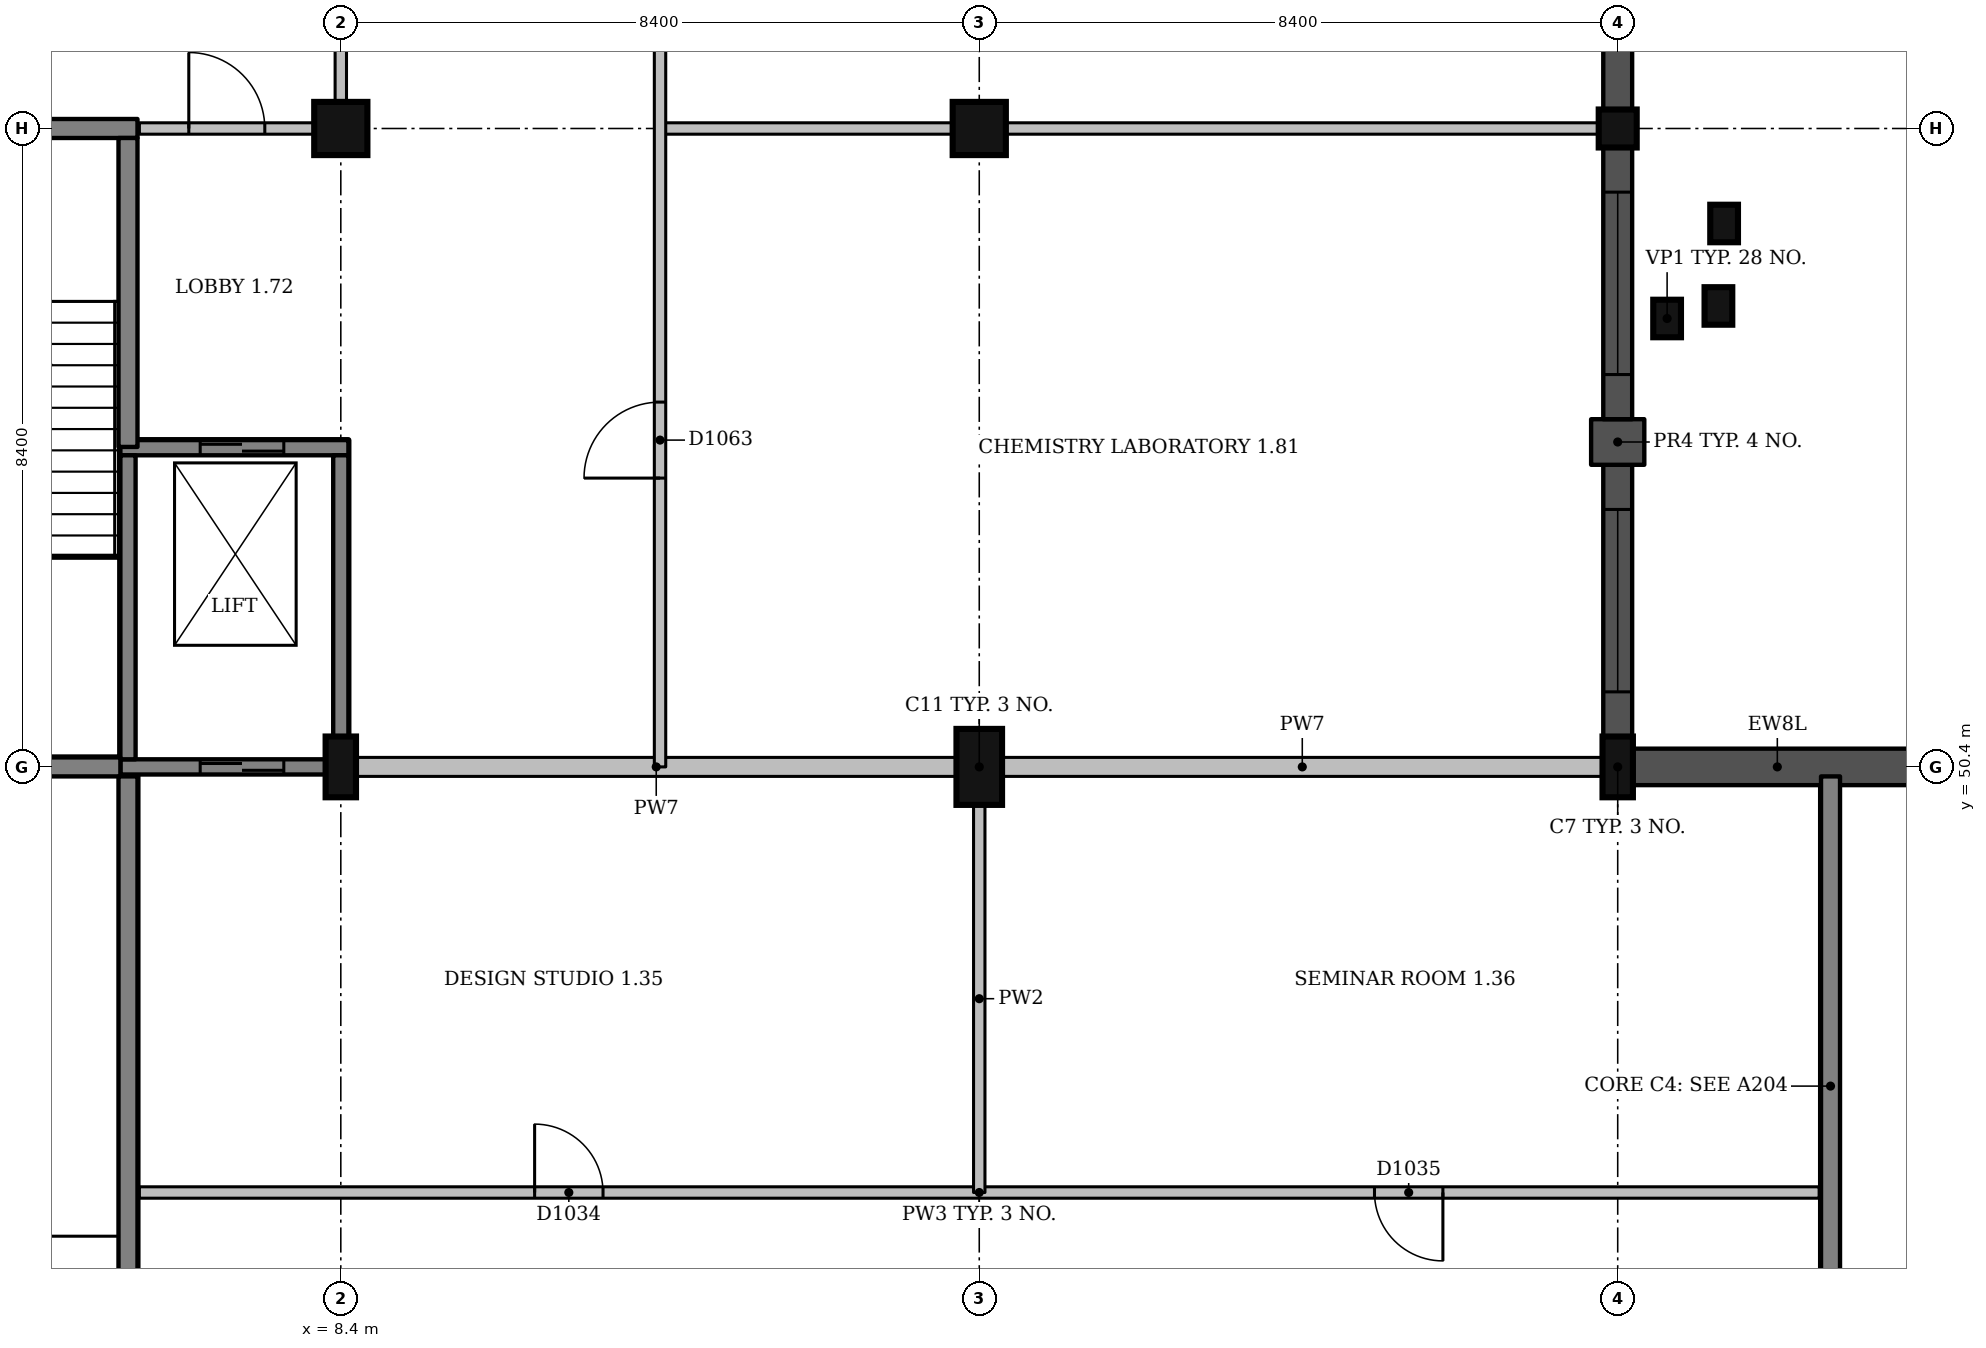
"""IFC4 building model, lengths in metres.
Left out: names, types, materials, properties, quantities, classifications, styles, units other than length and angle.
Written with IfcOpenShell. Run it as: python <this file> out.ifc"""

import sys

from ifc_helpers import new_model, si_unit, direction, frame, frame_2d, origin, origin_2d, place, context, subcontext, project, spatial, rectangle, extrude, element, fill, save


model = new_model("IFC4")
c1 = context("Model", 3, precision=1e-05, world=origin(), true_north=direction((0.0, 1.0)))
c2 = subcontext(c1, "Body", "Model", "MODEL_VIEW")
j1 = project(units=[si_unit("LENGTHUNIT", "METRE"), si_unit("PLANEANGLEUNIT", "RADIAN")], contexts=[c1])
p1 = place(None, origin())
s1 = spatial("IfcSite", under=j1, at=p1, CompositionType="ELEMENT")
p2 = place(p1, origin())
s2 = spatial("IfcBuilding", under=s1, at=p2, CompositionType="ELEMENT")
p3 = place(p2, frame((0.0, 0.0, 4.5)))
s3 = spatial("IfcBuildingStorey", under=s2, at=p3, CompositionType="ELEMENT", Elevation=4.5)
p4 = place(p3, frame((8.4, 50.4, 0.0), z_axis=(0.0, 0.0, 1.0), x_axis=(1.0, 0.0, 0.0)))
e1 = element("IfcColumn", 1, at=p4, inside=s3, PredefinedType="COLUMN", context=c2, shape_type="SweptSolid", body=[
    extrude(rectangle(XDim=0.4, YDim=0.8, at=origin_2d()), origin(), (0.0, 0.0, 1.0), 4.5),
])
p5 = place(p3, frame((16.8, 50.4, 0.0), z_axis=(0.0, 0.0, 1.0), x_axis=(1.0, 0.0, 0.0)))
e2 = element("IfcColumn", 2, at=p5, inside=s3, PredefinedType="COLUMN", context=c2, shape_type="SweptSolid", body=[
    extrude(rectangle(XDim=0.6, YDim=1.0, at=origin_2d()), origin(), (0.0, 0.0, 1.0), 4.5),
])
p6 = place(p3, frame((25.2, 50.4, 0.0), z_axis=(0.0, 0.0, 1.0), x_axis=(1.0, 0.0, 0.0)))
e3 = element("IfcColumn", 3, at=p6, inside=s3, PredefinedType="COLUMN", context=c2, shape_type="SweptSolid", body=[
    extrude(rectangle(XDim=0.4, YDim=0.8, at=origin_2d()), origin(), (0.0, 0.0, 1.0), 4.5),
])
for number, where, z_axis, x_axis in (
    (4, (8.4, 58.8, -1.5), (0.0, 0.0, 1.0), (1.0, 0.0, 0.0)),
    (5, (16.8, 58.8, -1.5), (0.0, 0.0, 1.0), (1.0, 0.0, 0.0)),
):
    element("IfcColumn", number, at=place(p3, frame(where, z_axis=z_axis, x_axis=x_axis)), inside=s3, PredefinedType="COLUMN", context=c2, shape_type="SweptSolid", body=[
        extrude(rectangle(XDim=0.7, YDim=0.7, at=origin_2d()), origin(), (0.0, 0.0, 1.0), 6.0),
    ])
p7 = place(p3, frame((25.2, 58.8, -1.5), z_axis=(0.0, 0.0, 1.0), x_axis=(1.0, 0.0, 0.0)))
e6 = element("IfcColumn", 6, at=p7, inside=s3, PredefinedType="COLUMN", context=c2, shape_type="SweptSolid", body=[
    extrude(rectangle(XDim=0.5, YDim=0.5, at=origin_2d()), origin(), (0.0, 0.0, 1.0), 6.0),
])
p8 = place(p3, frame((5.5, 50.4, 0.0), z_axis=(0.0, 0.0, 1.0), x_axis=(1.0, 0.0, 0.0)))
e7 = element("IfcWall", 7, at=p8, inside=s3, PredefinedType="SHEAR", context=c2, shape_type="SweptSolid", body=[
    extrude(rectangle(XDim=2.7, YDim=0.2, at=frame_2d((1.35, 0.0))), origin(), (0.0, 0.0, 1.0), 4.5),
])
p9 = place(p8, frame((1.05, 0.0, 0.0)))
e8 = element("IfcOpeningElement", 8, at=p9, cuts=e7, PredefinedType="OPENING", context=c2, shape_type="SweptSolid", body=[
    extrude(rectangle(XDim=1.1, YDim=2.1, at=frame_2d((0.55, 1.05))), frame((0.0, 0.11, 0.0), z_axis=(0.0, -1.0, 0.0), x_axis=(1.0, 0.0, 0.0)), (0.0, 0.0, 1.0), 0.22),
])
p10 = place(p3, frame((5.5, 54.6, 0.0), z_axis=(0.0, 0.0, 1.0), x_axis=(1.0, 0.0, 0.0)))
e9 = element("IfcWall", 9, at=p10, inside=s3, PredefinedType="SHEAR", context=c2, shape_type="SweptSolid", body=[
    extrude(rectangle(XDim=3.0, YDim=0.2, at=frame_2d((1.5, 0.0))), origin(), (0.0, 0.0, 1.0), 4.5),
])
p11 = place(p10, frame((1.05, 0.0, 0.0)))
e10 = element("IfcOpeningElement", 10, at=p11, cuts=e9, PredefinedType="OPENING", context=c2, shape_type="SweptSolid", body=[
    extrude(rectangle(XDim=1.1, YDim=2.1, at=frame_2d((0.55, 1.05))), frame((0.0, 0.11, 0.0), z_axis=(0.0, -1.0, 0.0), x_axis=(1.0, 0.0, 0.0)), (0.0, 0.0, 1.0), 0.22),
])
p12 = place(p3, frame((5.6, 50.5, 0.0), z_axis=(0.0, 0.0, 1.0), x_axis=(0.0, 1.0, 0.0)))
e11 = element("IfcWall", 11, at=p12, inside=s3, PredefinedType="SHEAR", context=c2, shape_type="SweptSolid", body=[
    extrude(rectangle(XDim=4.0, YDim=0.2, at=frame_2d((2.0, 0.0))), origin(), (0.0, 0.0, 1.0), 4.5),
])
p13 = place(p3, frame((8.4, 50.8, 0.0), z_axis=(0.0, 0.0, 1.0), x_axis=(0.0, 1.0, 0.0)))
e12 = element("IfcWall", 12, at=p13, inside=s3, PredefinedType="SHEAR", context=c2, shape_type="SweptSolid", body=[
    extrude(rectangle(XDim=3.7, YDim=0.2, at=frame_2d((1.85, 0.0))), origin(), (0.0, 0.0, 1.0), 4.5),
])
p14 = place(p3, frame((0.3, 50.4, 0.0), z_axis=(0.0, 0.0, 1.0), x_axis=(1.0, 0.0, 0.0)))
e13 = element("IfcWall", 13, at=p14, inside=s3, PredefinedType="SHEAR", context=c2, shape_type="SweptSolid", body=[
    extrude(rectangle(XDim=5.2, YDim=0.25, at=frame_2d((2.6, 0.0))), origin(), (0.0, 0.0, 1.0), 4.5),
])
p15 = place(p3, frame((5.6, 42.125, 0.0), z_axis=(0.0, 0.0, 1.0), x_axis=(0.0, 1.0, 0.0)))
e14 = element("IfcWall", 14, at=p15, inside=s3, PredefinedType="SHEAR", context=c2, shape_type="SweptSolid", body=[
    extrude(rectangle(XDim=8.15, YDim=0.25, at=frame_2d((4.075, 0.0))), origin(), (0.0, 0.0, 1.0), 4.5),
])
p16 = place(p15, frame((0.55, 0.0, 0.0)))
e15 = element("IfcOpeningElement", 15, at=p16, cuts=e14, PredefinedType="OPENING", context=c2, shape_type="SweptSolid", body=[
    extrude(rectangle(XDim=1.0, YDim=2.1, at=frame_2d((0.5, 1.05))), frame((0.0, 0.135, 0.0), z_axis=(0.0, -1.0, 0.0), x_axis=(1.0, 0.0, 0.0)), (0.0, 0.0, 1.0), 0.27),
])
p17 = place(p3, frame((28.0, 42.125, 0.0), z_axis=(0.0, 0.0, 1.0), x_axis=(0.0, 1.0, 0.0)))
e16 = element("IfcWall", 16, at=p17, inside=s3, PredefinedType="SHEAR", context=c2, shape_type="SweptSolid", body=[
    extrude(rectangle(XDim=8.15, YDim=0.25, at=frame_2d((4.075, 0.0))), origin(), (0.0, 0.0, 1.0), 4.5),
])
p18 = place(p17, frame((0.55, 0.0, 0.0)))
e17 = element("IfcOpeningElement", 17, at=p18, cuts=e16, PredefinedType="OPENING", context=c2, shape_type="SweptSolid", body=[
    extrude(rectangle(XDim=1.0, YDim=2.1, at=frame_2d((0.5, 1.05))), frame((0.0, 0.135, 0.0), z_axis=(0.0, -1.0, 0.0), x_axis=(1.0, 0.0, 0.0)), (0.0, 0.0, 1.0), 0.27),
])
p19 = place(p3, frame((0.25, 58.8, 0.0), z_axis=(0.0, 0.0, 1.0), x_axis=(1.0, 0.0, 0.0)))
e18 = element("IfcWall", 18, at=p19, inside=s3, PredefinedType="SHEAR", context=c2, shape_type="SweptSolid", body=[
    extrude(rectangle(XDim=5.475, YDim=0.25, at=frame_2d((2.738, 0.0))), origin(), (0.0, 0.0, 1.0), 4.5),
])
p20 = place(p19, frame((2.05, 0.0, 0.0)))
e19 = element("IfcOpeningElement", 19, at=p20, cuts=e18, PredefinedType="OPENING", context=c2, shape_type="SweptSolid", body=[
    extrude(rectangle(XDim=1.0, YDim=2.1, at=frame_2d((0.5, 1.05))), frame((0.0, 0.135, 0.0), z_axis=(0.0, -1.0, 0.0), x_axis=(1.0, 0.0, 0.0)), (0.0, 0.0, 1.0), 0.27),
])
p21 = place(p3, frame((5.6, 54.61, 0.0), z_axis=(0.0, 0.0, 1.0), x_axis=(0.0, 1.0, 0.0)))
e20 = element("IfcWall", 20, at=p21, inside=s3, PredefinedType="SHEAR", context=c2, shape_type="SweptSolid", body=[
    extrude(rectangle(XDim=4.065, YDim=0.25, at=frame_2d((2.032, 0.0))), origin(), (0.0, 0.0, 1.0), 4.5),
])
p22 = place(p3, frame((25.85, 56.3, 0.0), z_axis=(0.0, 0.0, 1.0), x_axis=(0.0, 1.0, 0.0)))
e21 = element("IfcColumn", 21, at=p22, inside=s3, PredefinedType="COLUMN", context=c2, shape_type="SweptSolid", body=[
    extrude(rectangle(XDim=0.365, YDim=0.494, at=origin_2d()), origin(), (0.0, 0.0, 1.0), 2.176),
])
for number, where, z_axis, x_axis in (
    (22, (26.525, 56.465, 0.0), (0.0, 0.0, 1.0), (1.0, 0.0, 0.0)),
    (23, (26.6, 57.55, 0.0), (0.0, 0.0, 1.0), (1.0, 0.0, 0.0)),
):
    element("IfcColumn", number, at=place(p3, frame(where, z_axis=z_axis, x_axis=x_axis)), inside=s3, PredefinedType="COLUMN", context=c2, shape_type="SweptSolid", body=[
        extrude(rectangle(XDim=0.365, YDim=0.494, at=origin_2d()), origin(), (0.0, 0.0, 1.0), 3.452),
    ])
p23 = place(p3, frame((29.2, 50.4, 0.0), z_axis=(0.0, 0.0, 1.0), x_axis=(-1.0, 0.0, 0.0)))
e24 = element("IfcWall", 24, at=p23, inside=s3, PredefinedType="SOLIDWALL", context=c2, shape_type="SweptSolid", body=[
    extrude(rectangle(XDim=3.8, YDim=0.48, at=frame_2d((1.9, 0.0))), origin(), (0.0, 0.0, 1.0), 3.75),
])
p24 = place(p3, frame((25.2, 50.8, 0.0), z_axis=(0.0, 0.0, 1.0), x_axis=(0.0, 1.0, 0.0)))
e25 = element("IfcWall", 25, at=p24, inside=s3, PredefinedType="SOLIDWALL", context=c2, shape_type="SweptSolid", body=[
    extrude(rectangle(XDim=3.575, YDim=0.38, at=frame_2d((1.788, 0.0))), origin(), (0.0, 0.0, 1.0), 4.2),
])
p25 = place(p24, frame((0.587, 0.0, 1.2)))
e26 = element("IfcOpeningElement", 26, at=p25, cuts=e25, PredefinedType="OPENING", context=c2, shape_type="SweptSolid", body=[
    extrude(rectangle(XDim=2.4, YDim=1.5, at=frame_2d((1.2, 0.75))), frame((0.0, 0.2, 0.0), z_axis=(0.0, -1.0, 0.0), x_axis=(1.0, 0.0, 0.0)), (0.0, 0.0, 1.0), 0.4),
])
p26 = place(p3, frame((25.2, 54.375, 0.0), z_axis=(0.0, 0.0, 1.0), x_axis=(0.0, 1.0, 0.0)))
e27 = element("IfcWall", 27, at=p26, inside=s3, PredefinedType="SOLIDWALL", context=c2, shape_type="SweptSolid", body=[
    extrude(rectangle(XDim=0.6, YDim=0.7, at=frame_2d((0.3, 0.0))), origin(), (0.0, 0.0, 1.0), 4.2),
])
p27 = place(p3, frame((25.2, 54.975, 0.0), z_axis=(0.0, 0.0, 1.0), x_axis=(0.0, 1.0, 0.0)))
e28 = element("IfcWall", 28, at=p27, inside=s3, PredefinedType="SOLIDWALL", context=c2, shape_type="SweptSolid", body=[
    extrude(rectangle(XDim=3.575, YDim=0.38, at=frame_2d((1.788, 0.0))), origin(), (0.0, 0.0, 1.0), 4.2),
])
p28 = place(p27, frame((0.587, 0.0, 1.2)))
e29 = element("IfcOpeningElement", 29, at=p28, cuts=e28, PredefinedType="OPENING", context=c2, shape_type="SweptSolid", body=[
    extrude(rectangle(XDim=2.4, YDim=1.5, at=frame_2d((1.2, 0.75))), frame((0.0, 0.2, 0.0), z_axis=(0.0, -1.0, 0.0), x_axis=(1.0, 0.0, 0.0)), (0.0, 0.0, 1.0), 0.4),
])
p29 = place(p3, frame((25.2, 59.05, 0.0), z_axis=(0.0, 0.0, 1.0), x_axis=(0.0, 1.0, 0.0)))
e30 = element("IfcWall", 30, at=p29, inside=s3, PredefinedType="SOLIDWALL", context=c2, shape_type="SweptSolid", body=[
    extrude(rectangle(XDim=2.15, YDim=0.38, at=frame_2d((1.075, 0.0))), origin(), (0.0, 0.0, 1.0), 3.35),
])
p30 = place(p3, frame((5.75, 44.8, 0.0), z_axis=(0.0, 0.0, 1.0), x_axis=(1.0, 0.0, 0.0)))
e31 = element("IfcWall", 31, at=p30, inside=s3, PredefinedType="PARTITIONING", context=c2, shape_type="SweptSolid", body=[
    extrude(rectangle(XDim=22.1, YDim=0.15, at=frame_2d((11.05, 0.0))), origin(), (0.0, 0.0, 1.0), 4.15),
])
p31 = place(p30, frame((5.2, 0.0, 0.0)))
e32 = element("IfcOpeningElement", 32, at=p31, cuts=e31, PredefinedType="OPENING", context=c2, shape_type="SweptSolid", body=[
    extrude(rectangle(XDim=0.9, YDim=2.1, at=frame_2d((0.45, 1.05))), frame((0.0, 0.085, 0.0), z_axis=(0.0, -1.0, 0.0), x_axis=(1.0, 0.0, 0.0)), (0.0, 0.0, 1.0), 0.17),
])
p32 = place(p30, frame((16.25, 0.0, 0.0)))
e33 = element("IfcOpeningElement", 33, at=p32, cuts=e31, PredefinedType="OPENING", context=c2, shape_type="SweptSolid", body=[
    extrude(rectangle(XDim=0.9, YDim=2.1, at=frame_2d((0.45, 1.05))), frame((0.0, 0.085, 0.0), z_axis=(0.0, -1.0, 0.0), x_axis=(1.0, 0.0, 0.0)), (0.0, 0.0, 1.0), 0.17),
])
p33 = place(p3, frame((8.6, 50.4, 0.0), z_axis=(0.0, 0.0, 1.0), x_axis=(1.0, 0.0, 0.0)))
e34 = element("IfcWall", 34, at=p33, inside=s3, PredefinedType="SOLIDWALL", context=c2, shape_type="SweptSolid", body=[
    extrude(rectangle(XDim=7.9, YDim=0.25, at=frame_2d((3.95, 0.0))), origin(), (0.0, 0.0, 1.0), 3.4),
])
p34 = place(p3, frame((17.1, 50.4, 0.0), z_axis=(0.0, 0.0, 1.0), x_axis=(1.0, 0.0, 0.0)))
e35 = element("IfcWall", 35, at=p34, inside=s3, PredefinedType="SOLIDWALL", context=c2, shape_type="SweptSolid", body=[
    extrude(rectangle(XDim=7.9, YDim=0.25, at=frame_2d((3.95, 0.0))), origin(), (0.0, 0.0, 1.0), 3.35),
])
p35 = place(p3, frame((12.6, 58.8, 0.0), z_axis=(0.0, 0.0, 1.0), x_axis=(1.0, 0.0, 0.0)))
e36 = element("IfcWall", 36, at=p35, inside=s3, PredefinedType="PARTITIONING", context=c2, shape_type="SweptSolid", body=[
    extrude(rectangle(XDim=3.85, YDim=0.15, at=frame_2d((1.925, 0.0))), origin(), (0.0, 0.0, 1.0), 3.4),
])
p36 = place(p3, frame((17.15, 58.8, 0.0), z_axis=(0.0, 0.0, 1.0), x_axis=(1.0, 0.0, 0.0)))
e37 = element("IfcWall", 37, at=p36, inside=s3, PredefinedType="PARTITIONING", context=c2, shape_type="SweptSolid", body=[
    extrude(rectangle(XDim=7.8, YDim=0.15, at=frame_2d((3.9, 0.0))), origin(), (0.0, 0.0, 1.0), 3.4),
])
p37 = place(p3, frame((5.75, 58.8, 0.0), z_axis=(0.0, 0.0, 1.0), x_axis=(1.0, 0.0, 0.0)))
e38 = element("IfcWall", 38, at=p37, inside=s3, PredefinedType="PARTITIONING", context=c2, shape_type="SweptSolid", body=[
    extrude(rectangle(XDim=2.3, YDim=0.15, at=frame_2d((1.15, 0.0))), origin(), (0.0, 0.0, 1.0), 3.5),
])
p38 = place(p37, frame((0.65, 0.0, 0.0)))
e39 = element("IfcOpeningElement", 39, at=p38, cuts=e38, PredefinedType="OPENING", context=c2, shape_type="SweptSolid", body=[
    extrude(rectangle(XDim=1.0, YDim=2.1, at=frame_2d((0.5, 1.05))), frame((0.0, 0.085, 0.0), z_axis=(0.0, -1.0, 0.0), x_axis=(1.0, 0.0, 0.0)), (0.0, 0.0, 1.0), 0.17),
])
p39 = place(p3, frame((8.4, 59.15, 0.0), z_axis=(0.0, 0.0, 1.0), x_axis=(0.0, 1.0, 0.0)))
e40 = element("IfcWall", 40, at=p39, inside=s3, PredefinedType="PARTITIONING", context=c2, shape_type="SweptSolid", body=[
    extrude(rectangle(XDim=7.7, YDim=0.15, at=frame_2d((3.85, 0.0))), origin(), (0.0, 0.0, 1.0), 3.4),
])
p40 = place(p3, frame((12.6, 50.4, 0.0), z_axis=(0.0, 0.0, 1.0), x_axis=(0.0, 1.0, 0.0)))
e41 = element("IfcWall", 41, at=p40, inside=s3, PredefinedType="PARTITIONING", context=c2, shape_type="SweptSolid", body=[
    extrude(rectangle(XDim=25.2, YDim=0.15, at=frame_2d((12.6, 0.0))), origin(), (0.0, 0.0, 1.0), 3.4),
])
p41 = place(p40, frame((3.8, 0.0, 0.0)))
e42 = element("IfcOpeningElement", 42, at=p41, cuts=e41, PredefinedType="OPENING", context=c2, shape_type="SweptSolid", body=[
    extrude(rectangle(XDim=1.0, YDim=2.1, at=frame_2d((0.5, 1.05))), frame((0.0, 0.085, 0.0), z_axis=(0.0, -1.0, 0.0), x_axis=(1.0, 0.0, 0.0)), (0.0, 0.0, 1.0), 0.17),
])
p42 = place(p40, frame((12.2, 0.0, 0.0)))
e43 = element("IfcOpeningElement", 43, at=p42, cuts=e41, PredefinedType="OPENING", context=c2, shape_type="SweptSolid", body=[
    extrude(rectangle(XDim=1.0, YDim=2.1, at=frame_2d((0.5, 1.05))), frame((0.0, 0.085, 0.0), z_axis=(0.0, -1.0, 0.0), x_axis=(1.0, 0.0, 0.0)), (0.0, 0.0, 1.0), 0.17),
])
p43 = place(p3, frame((16.8, 44.8, 0.0), z_axis=(0.0, 0.0, 1.0), x_axis=(0.0, 1.0, 0.0)))
e44 = element("IfcWall", 44, at=p43, inside=s3, PredefinedType="PARTITIONING", context=c2, shape_type="SweptSolid", body=[
    extrude(rectangle(XDim=5.1, YDim=0.15, at=frame_2d((2.55, 0.0))), origin(), (0.0, 0.0, 1.0), 2.489),
])
p44 = place(p25, origin())
e45 = element("IfcWindow", 45, at=p44, inside=s3, PartitioningType="SINGLE_PANEL", PredefinedType="WINDOW", context=c2, shape_type="SweptSolid", body=[
    extrude(rectangle(XDim=2.4, YDim=1.5, at=frame_2d((1.2, 0.75))), frame((0.0, 0.15, 0.0), z_axis=(0.0, -1.0, 0.0), x_axis=(1.0, 0.0, 0.0)), (0.0, 0.0, 1.0), 0.06),
])
fill(e26, e45)
p45 = place(p28, origin())
e46 = element("IfcWindow", 46, at=p45, inside=s3, PartitioningType="SINGLE_PANEL", PredefinedType="WINDOW", context=c2, shape_type="SweptSolid", body=[
    extrude(rectangle(XDim=2.4, YDim=1.5, at=frame_2d((1.2, 0.75))), frame((0.0, 0.15, 0.0), z_axis=(0.0, -1.0, 0.0), x_axis=(1.0, 0.0, 0.0)), (0.0, 0.0, 1.0), 0.06),
])
fill(e29, e46)
p46 = place(p31, origin())
e47 = element("IfcDoor", 47, at=p46, inside=s3, OperationType="SINGLE_SWING_LEFT", PredefinedType="DOOR", context=c2, shape_type="SweptSolid", body=[
    extrude(rectangle(XDim=0.9, YDim=2.1, at=frame_2d((0.45, 1.05))), frame((0.0, 0.025, 0.0), z_axis=(0.0, -1.0, 0.0), x_axis=(1.0, 0.0, 0.0)), (0.0, 0.0, 1.0), 0.05),
])
fill(e32, e47)
p47 = place(p32, origin())
e48 = element("IfcDoor", 48, at=p47, inside=s3, OperationType="SINGLE_SWING_RIGHT", PredefinedType="DOOR", context=c2, shape_type="SweptSolid", body=[
    extrude(rectangle(XDim=0.9, YDim=2.1, at=frame_2d((0.45, 1.05))), frame((0.0, 0.025, 0.0), z_axis=(0.0, -1.0, 0.0), x_axis=(1.0, 0.0, 0.0)), (0.0, 0.0, 1.0), 0.05),
])
fill(e33, e48)
p48 = place(p38, origin())
e49 = element("IfcDoor", 49, at=p48, inside=s3, OperationType="SINGLE_SWING_LEFT", PredefinedType="DOOR", context=c2, shape_type="SweptSolid", body=[
    extrude(rectangle(XDim=1.0, YDim=2.1, at=frame_2d((0.5, 1.05))), frame((0.0, 0.025, 0.0), z_axis=(0.0, -1.0, 0.0), x_axis=(1.0, 0.0, 0.0)), (0.0, 0.0, 1.0), 0.05),
])
fill(e39, e49)
p49 = place(p41, origin())
e50 = element("IfcDoor", 50, at=p49, inside=s3, OperationType="SINGLE_SWING_LEFT", PredefinedType="DOOR", context=c2, shape_type="SweptSolid", body=[
    extrude(rectangle(XDim=1.0, YDim=2.1, at=frame_2d((0.5, 1.05))), frame((0.0, 0.025, 0.0), z_axis=(0.0, -1.0, 0.0), x_axis=(1.0, 0.0, 0.0)), (0.0, 0.0, 1.0), 0.05),
])
fill(e42, e50)
p50 = place(p9, origin())
e51 = element("IfcDoor", 51, at=p50, inside=s3, OperationType="SLIDING_TO_RIGHT", PredefinedType="DOOR", context=c2, shape_type="SweptSolid", body=[
    extrude(rectangle(XDim=1.1, YDim=2.1, at=frame_2d((0.55, 1.05))), frame((0.0, 0.025, 0.0), z_axis=(0.0, -1.0, 0.0), x_axis=(1.0, 0.0, 0.0)), (0.0, 0.0, 1.0), 0.05),
])
fill(e8, e51)
p51 = place(p11, origin())
e52 = element("IfcDoor", 52, at=p51, inside=s3, OperationType="SLIDING_TO_LEFT", PredefinedType="DOOR", context=c2, shape_type="SweptSolid", body=[
    extrude(rectangle(XDim=1.1, YDim=2.1, at=frame_2d((0.55, 1.05))), frame((0.0, 0.025, 0.0), z_axis=(0.0, -1.0, 0.0), x_axis=(1.0, 0.0, 0.0)), (0.0, 0.0, 1.0), 0.05),
])
fill(e10, e52)
save(model, sys.argv[1])
